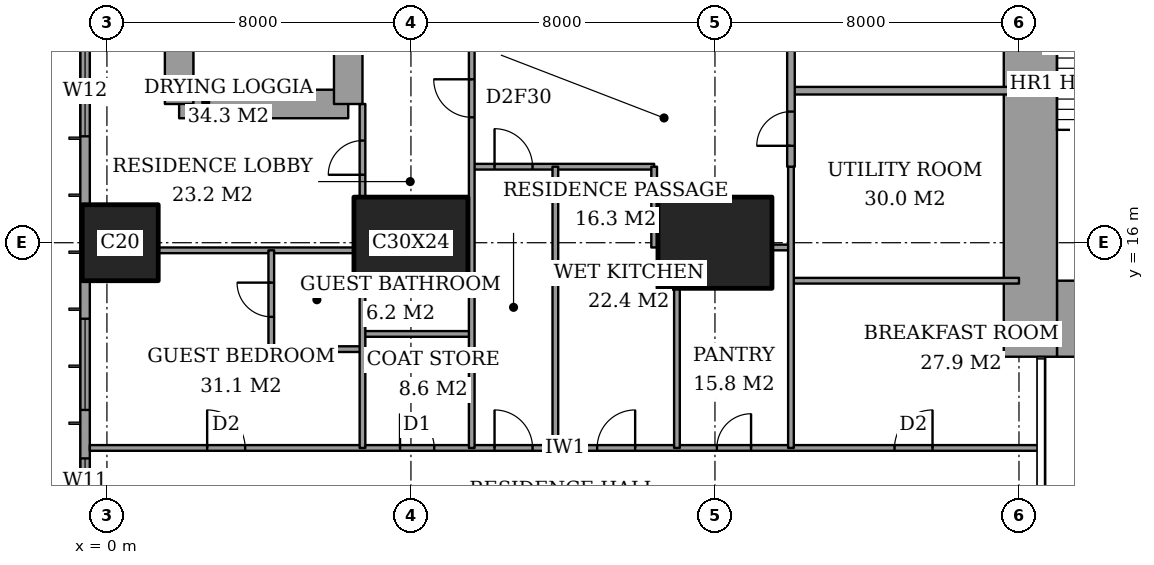
"""IFC4 building model, lengths in metres.
Left out: names, types, materials, properties, quantities, classifications, styles, units other than length and angle.
Written with IfcOpenShell. Run it as: python <this file> out.ifc"""

import sys

from ifc_helpers import new_model, si_unit, direction, frame, frame_2d, origin, origin_2d, place, context, subcontext, project, spatial, rectangle, extrude, element, fill, save


model = new_model("IFC4")
c1 = context("Model", 3, precision=1e-05, world=origin(), true_north=direction((0.0, 1.0)))
c2 = subcontext(c1, "Body", "Model", "MODEL_VIEW")
j1 = project(units=[si_unit("LENGTHUNIT", "METRE"), si_unit("PLANEANGLEUNIT", "RADIAN")], contexts=[c1])
p1 = place(None, origin())
s1 = spatial("IfcSite", under=j1, at=p1, CompositionType="ELEMENT")
p2 = place(p1, origin())
s2 = spatial("IfcBuilding", under=s1, at=p2, CompositionType="ELEMENT")
p3 = place(p2, frame((0.0, 0.0, 110.6)))
s3 = spatial("IfcBuildingStorey", under=s2, at=p3, CompositionType="ELEMENT", Elevation=110.6)
p4 = place(p3, frame((0.35, 16.0, 0.0), z_axis=(0.0, 0.0, 1.0), x_axis=(1.0, 0.0, 0.0)))
e1 = element("IfcColumn", 1, at=p4, inside=s3, PredefinedType="COLUMN", context=c2, shape_type="SweptSolid", body=[
    extrude(rectangle(XDim=2.0, YDim=2.0, at=origin_2d()), origin(), (0.0, 0.0, 1.0), 3.6),
])
for number, where, z_axis, x_axis in (
    (2, (8.0, 16.0, 0.0), (0.0, 0.0, 1.0), (1.0, 0.0, 0.0)),
    (3, (16.0, 16.0, 0.0), (0.0, 0.0, 1.0), (1.0, 0.0, 0.0)),
):
    element("IfcColumn", number, at=place(p3, frame(where, z_axis=z_axis, x_axis=x_axis)), inside=s3, PredefinedType="COLUMN", context=c2, shape_type="SweptSolid", body=[
        extrude(rectangle(XDim=3.0, YDim=2.4, at=origin_2d()), origin(), (0.0, 0.0, 1.0), 3.6),
    ])
p5 = place(p3, frame((25.0, 14.0, 0.0), z_axis=(0.0, 0.0, 1.0), x_axis=(1.0, 0.0, 0.0)))
e4 = element("IfcWall", 4, at=p5, inside=s3, PredefinedType="SHEAR", context=c2, shape_type="SweptSolid", body=[
    extrude(rectangle(XDim=3.15, YDim=2.0, at=frame_2d((1.575, 0.0))), origin(), (0.0, 0.0, 1.0), 3.6),
])
p6 = place(p3, frame((24.3, 13.0, 0.0), z_axis=(0.0, 0.0, 1.0), x_axis=(0.0, 1.0, 0.0)))
e5 = element("IfcWall", 5, at=p6, inside=s3, PredefinedType="SHEAR", context=c2, shape_type="SweptSolid", body=[
    extrude(rectangle(XDim=10.15, YDim=1.4, at=frame_2d((5.075, 0.0))), origin(), (0.0, 0.0, 1.0), 3.6),
])
p7 = place(p3, frame((1.9, 19.65, 0.0), z_axis=(0.0, 0.0, 1.0), x_axis=(1.0, 0.0, 0.0)))
e6 = element("IfcWall", 6, at=p7, inside=s3, PredefinedType="SHEAR", context=c2, shape_type="SweptSolid", body=[
    extrude(rectangle(XDim=4.45, YDim=0.75, at=frame_2d((2.225, 0.0))), origin(), (0.0, 0.0, 1.0), 3.6),
])
p8 = place(p3, frame((6.35, 19.65, 0.0), z_axis=(0.0, 0.0, 1.0), x_axis=(0.0, 1.0, 0.0)))
e7 = element("IfcWall", 7, at=p8, inside=s3, PredefinedType="SHEAR", context=c2, shape_type="SweptSolid", body=[
    extrude(rectangle(XDim=8.7, YDim=0.75, at=frame_2d((4.35, 0.0))), origin(), (0.0, 0.0, 1.0), 3.6),
])
p9 = place(p8, frame((6.725, 0.0, 0.0)))
e8 = element("IfcOpeningElement", 8, at=p9, cuts=e7, PredefinedType="OPENING", context=c2, shape_type="SweptSolid", body=[
    extrude(rectangle(XDim=1.0, YDim=2.1, at=frame_2d((0.5, 1.05))), frame((0.0, 0.385, 0.0), z_axis=(0.0, -1.0, 0.0), x_axis=(1.0, 0.0, 0.0)), (0.0, 0.0, 1.0), 0.77),
])
p10 = place(p3, frame((1.9, 28.35, 0.0), z_axis=(0.0, 0.0, 1.0), x_axis=(0.0, -1.0, 0.0)))
e9 = element("IfcWall", 9, at=p10, inside=s3, PredefinedType="SHEAR", context=c2, shape_type="SweptSolid", body=[
    extrude(rectangle(XDim=8.7, YDim=0.75, at=frame_2d((4.35, 0.0))), origin(), (0.0, 0.0, 1.0), 3.6),
])
p11 = place(p3, frame((-0.575, 44.825, 0.0), z_axis=(0.0, 0.0, 1.0), x_axis=(0.0, -1.0, 0.0)))
e10 = element("IfcWall", 10, at=p11, inside=s3, PredefinedType="SOLIDWALL", context=c2, shape_type="SweptSolid", body=[
    extrude(rectangle(XDim=41.65, YDim=0.25, at=frame_2d((20.825, 0.0))), origin(), (0.0, 0.0, 1.0), 3.6),
])
p12 = place(p11, frame((0.775, 0.0, 0.4)))
e11 = element("IfcOpeningElement", 11, at=p12, cuts=e10, PredefinedType="OPENING", context=c2, shape_type="SweptSolid", body=[
    extrude(rectangle(XDim=2.4, YDim=2.2, at=frame_2d((1.2, 1.1))), frame((0.0, 0.135, 0.0), z_axis=(0.0, -1.0, 0.0), x_axis=(1.0, 0.0, 0.0)), (0.0, 0.0, 1.0), 0.27),
])
p13 = place(p11, frame((6.2, 0.0, 0.4)))
e12 = element("IfcOpeningElement", 12, at=p13, cuts=e10, PredefinedType="OPENING", context=c2, shape_type="SweptSolid", body=[
    extrude(rectangle(XDim=1.2, YDim=2.2, at=frame_2d((0.6, 1.1))), frame((0.0, 0.135, 0.0), z_axis=(0.0, -1.0, 0.0), x_axis=(1.0, 0.0, 0.0)), (0.0, 0.0, 1.0), 0.27),
])
p14 = place(p11, frame((8.525, 0.0, 0.4)))
e13 = element("IfcOpeningElement", 13, at=p14, cuts=e10, PredefinedType="OPENING", context=c2, shape_type="SweptSolid", body=[
    extrude(rectangle(XDim=2.4, YDim=2.2, at=frame_2d((1.2, 1.1))), frame((0.0, 0.135, 0.0), z_axis=(0.0, -1.0, 0.0), x_axis=(1.0, 0.0, 0.0)), (0.0, 0.0, 1.0), 0.27),
])
p15 = place(p11, frame((15.625, 0.0, 0.4)))
e14 = element("IfcOpeningElement", 14, at=p15, cuts=e10, PredefinedType="OPENING", context=c2, shape_type="SweptSolid", body=[
    extrude(rectangle(XDim=2.4, YDim=2.2, at=frame_2d((1.2, 1.1))), frame((0.0, 0.135, 0.0), z_axis=(0.0, -1.0, 0.0), x_axis=(1.0, 0.0, 0.0)), (0.0, 0.0, 1.0), 0.27),
])
p16 = place(p11, frame((23.625, 0.0, 0.4)))
e15 = element("IfcOpeningElement", 15, at=p16, cuts=e10, PredefinedType="OPENING", context=c2, shape_type="SweptSolid", body=[
    extrude(rectangle(XDim=2.4, YDim=2.2, at=frame_2d((1.2, 1.1))), frame((0.0, 0.135, 0.0), z_axis=(0.0, -1.0, 0.0), x_axis=(1.0, 0.0, 0.0)), (0.0, 0.0, 1.0), 0.27),
])
p17 = place(p11, frame((30.825, 0.0, 0.4)))
e16 = element("IfcOpeningElement", 16, at=p17, cuts=e10, PredefinedType="OPENING", context=c2, shape_type="SweptSolid", body=[
    extrude(rectangle(XDim=2.4, YDim=2.2, at=frame_2d((1.2, 1.1))), frame((0.0, 0.135, 0.0), z_axis=(0.0, -1.0, 0.0), x_axis=(1.0, 0.0, 0.0)), (0.0, 0.0, 1.0), 0.27),
])
p18 = place(p11, frame((34.5, 0.0, 0.4)))
e17 = element("IfcOpeningElement", 17, at=p18, cuts=e10, PredefinedType="OPENING", context=c2, shape_type="SweptSolid", body=[
    extrude(rectangle(XDim=1.2, YDim=2.2, at=frame_2d((0.6, 1.1))), frame((0.0, 0.135, 0.0), z_axis=(0.0, -1.0, 0.0), x_axis=(1.0, 0.0, 0.0)), (0.0, 0.0, 1.0), 0.27),
])
p19 = place(p11, frame((38.475, 0.0, 0.4)))
e18 = element("IfcOpeningElement", 18, at=p19, cuts=e10, PredefinedType="OPENING", context=c2, shape_type="SweptSolid", body=[
    extrude(rectangle(XDim=2.4, YDim=2.2, at=frame_2d((1.2, 1.1))), frame((0.0, 0.135, 0.0), z_axis=(0.0, -1.0, 0.0), x_axis=(1.0, 0.0, 0.0)), (0.0, 0.0, 1.0), 0.27),
])
p20 = place(p3, frame((-0.45, 10.6, 0.0), z_axis=(0.0, 0.0, 1.0), x_axis=(1.0, 0.0, 0.0)))
e19 = element("IfcWall", 19, at=p20, inside=s3, PredefinedType="PARTITIONING", context=c2, shape_type="SweptSolid", body=[
    extrude(rectangle(XDim=25.011, YDim=0.15, at=frame_2d((12.505, 0.0))), origin(), (0.0, 0.0, 1.0), 3.35),
])
p21 = place(p20, frame((10.65, 0.0, 0.0)))
e20 = element("IfcOpeningElement", 20, at=p21, cuts=e19, PredefinedType="OPENING", context=c2, shape_type="SweptSolid", body=[
    extrude(rectangle(XDim=1.0, YDim=2.1, at=frame_2d((0.5, 1.05))), frame((0.0, 0.085, 0.0), z_axis=(0.0, -1.0, 0.0), x_axis=(1.0, 0.0, 0.0)), (0.0, 0.0, 1.0), 0.17),
])
p22 = place(p20, frame((3.087, 0.0, 0.0)))
e21 = element("IfcOpeningElement", 21, at=p22, cuts=e19, PredefinedType="OPENING", context=c2, shape_type="SweptSolid", body=[
    extrude(rectangle(XDim=1.0, YDim=2.1, at=frame_2d((0.5, 1.05))), frame((0.0, 0.085, 0.0), z_axis=(0.0, -1.0, 0.0), x_axis=(1.0, 0.0, 0.0)), (0.0, 0.0, 1.0), 0.17),
])
p23 = place(p20, frame((8.163, 0.0, 0.0)))
e22 = element("IfcOpeningElement", 22, at=p23, cuts=e19, PredefinedType="OPENING", context=c2, shape_type="SweptSolid", body=[
    extrude(rectangle(XDim=0.9, YDim=2.1, at=frame_2d((0.45, 1.05))), frame((0.0, 0.085, 0.0), z_axis=(0.0, -1.0, 0.0), x_axis=(1.0, 0.0, 0.0)), (0.0, 0.0, 1.0), 0.17),
])
p24 = place(p20, frame((13.35, 0.0, 0.0)))
e23 = element("IfcOpeningElement", 23, at=p24, cuts=e19, PredefinedType="OPENING", context=c2, shape_type="SweptSolid", body=[
    extrude(rectangle(XDim=1.0, YDim=2.1, at=frame_2d((0.5, 1.05))), frame((0.0, 0.085, 0.0), z_axis=(0.0, -1.0, 0.0), x_axis=(1.0, 0.0, 0.0)), (0.0, 0.0, 1.0), 0.17),
])
p25 = place(p20, frame((16.5, 0.0, 0.0)))
e24 = element("IfcOpeningElement", 24, at=p25, cuts=e19, PredefinedType="OPENING", context=c2, shape_type="SweptSolid", body=[
    extrude(rectangle(XDim=0.9, YDim=2.1, at=frame_2d((0.45, 1.05))), frame((0.0, 0.085, 0.0), z_axis=(0.0, -1.0, 0.0), x_axis=(1.0, 0.0, 0.0)), (0.0, 0.0, 1.0), 0.17),
])
p26 = place(p20, frame((21.175, 0.0, 0.0)))
e25 = element("IfcOpeningElement", 25, at=p26, cuts=e19, PredefinedType="OPENING", context=c2, shape_type="SweptSolid", body=[
    extrude(rectangle(XDim=1.0, YDim=2.1, at=frame_2d((0.5, 1.05))), frame((0.0, 0.085, 0.0), z_axis=(0.0, -1.0, 0.0), x_axis=(1.0, 0.0, 0.0)), (0.0, 0.0, 1.0), 0.17),
])
p27 = place(p3, frame((4.325, 13.2, 0.0), z_axis=(0.0, 0.0, 1.0), x_axis=(1.0, 0.0, 0.0)))
e26 = element("IfcWall", 26, at=p27, inside=s3, PredefinedType="PARTITIONING", context=c2, shape_type="SweptSolid", body=[
    extrude(rectangle(XDim=2.4, YDim=0.15, at=frame_2d((1.2, 0.0))), origin(), (0.0, 0.0, 1.0), 3.35),
])
p28 = place(p3, frame((6.725, 13.6, 0.0), z_axis=(0.0, 0.0, 1.0), x_axis=(1.0, 0.0, 0.0)))
e27 = element("IfcWall", 27, at=p28, inside=s3, PredefinedType="PARTITIONING", context=c2, shape_type="SweptSolid", body=[
    extrude(rectangle(XDim=2.875, YDim=0.15, at=frame_2d((1.438, 0.0))), origin(), (0.0, 0.0, 1.0), 3.35),
])
p29 = place(p3, frame((18.0, 15.0, 0.0), z_axis=(0.0, 0.0, 1.0), x_axis=(1.0, 0.0, 0.0)))
e28 = element("IfcWall", 28, at=p29, inside=s3, PredefinedType="PARTITIONING", context=c2, shape_type="SweptSolid", body=[
    extrude(rectangle(XDim=6.0, YDim=0.15, at=frame_2d((3.0, 0.0))), origin(), (0.0, 0.0, 1.0), 3.35),
])
p30 = place(p3, frame((1.35, 15.8, 0.0), z_axis=(0.0, 0.0, 1.0), x_axis=(1.0, 0.0, 0.0)))
e29 = element("IfcWall", 29, at=p30, inside=s3, PredefinedType="PARTITIONING", context=c2, shape_type="SweptSolid", body=[
    extrude(rectangle(XDim=5.15, YDim=0.15, at=frame_2d((2.575, 0.0))), origin(), (0.0, 0.0, 1.0), 3.35),
])
p31 = place(p3, frame((17.5, 15.875, 0.0), z_axis=(0.0, 0.0, 1.0), x_axis=(1.0, 0.0, 0.0)))
e30 = element("IfcWall", 30, at=p31, inside=s3, PredefinedType="PARTITIONING", context=c2, shape_type="SweptSolid", body=[
    extrude(rectangle(XDim=0.5, YDim=0.15, at=frame_2d((0.25, 0.0))), origin(), (0.0, 0.0, 1.0), 2.634),
])
p32 = place(p3, frame((9.6, 18.0, 0.0), z_axis=(0.0, 0.0, 1.0), x_axis=(1.0, 0.0, 0.0)))
e31 = element("IfcWall", 31, at=p32, inside=s3, PredefinedType="PARTITIONING", context=c2, shape_type="SweptSolid", body=[
    extrude(rectangle(XDim=4.8, YDim=0.15, at=frame_2d((2.4, 0.0))), origin(), (0.0, 0.0, 1.0), 3.35),
])
p33 = place(p32, frame((0.6, 0.0, 0.0)))
e32 = element("IfcOpeningElement", 32, at=p33, cuts=e31, PredefinedType="OPENING", context=c2, shape_type="SweptSolid", body=[
    extrude(rectangle(XDim=1.0, YDim=2.1, at=frame_2d((0.5, 1.05))), frame((0.0, 0.085, 0.0), z_axis=(0.0, -1.0, 0.0), x_axis=(1.0, 0.0, 0.0)), (0.0, 0.0, 1.0), 0.17),
])
p34 = place(p3, frame((18.0, 20.0, 0.0), z_axis=(0.0, 0.0, 1.0), x_axis=(1.0, 0.0, 0.0)))
e33 = element("IfcWall", 33, at=p34, inside=s3, PredefinedType="PARTITIONING", context=c2, shape_type="SweptSolid", body=[
    extrude(rectangle(XDim=6.0, YDim=0.2, at=frame_2d((3.0, 0.0))), origin(), (0.0, 0.0, 1.0), 3.35),
])
p35 = place(p3, frame((4.325, 13.2, 0.0), z_axis=(0.0, 0.0, 1.0), x_axis=(0.0, 1.0, 0.0)))
e34 = element("IfcWall", 34, at=p35, inside=s3, PredefinedType="PARTITIONING", context=c2, shape_type="SweptSolid", body=[
    extrude(rectangle(XDim=2.6, YDim=0.15, at=frame_2d((1.3, 0.0))), origin(), (0.0, 0.0, 1.0), 3.35),
])
p36 = place(p35, frame((0.85, 0.0, 0.0)))
e35 = element("IfcOpeningElement", 35, at=p36, cuts=e34, PredefinedType="OPENING", context=c2, shape_type="SweptSolid", body=[
    extrude(rectangle(XDim=0.9, YDim=2.1, at=frame_2d((0.45, 1.05))), frame((0.0, 0.085, 0.0), z_axis=(0.0, -1.0, 0.0), x_axis=(1.0, 0.0, 0.0)), (0.0, 0.0, 1.0), 0.17),
])
p37 = place(p3, frame((6.725, 10.6, 0.0), z_axis=(0.0, 0.0, 1.0), x_axis=(0.0, 1.0, 0.0)))
e36 = element("IfcWall", 36, at=p37, inside=s3, PredefinedType="PARTITIONING", context=c2, shape_type="SweptSolid", body=[
    extrude(rectangle(XDim=4.2, YDim=0.15, at=frame_2d((2.1, 0.0))), origin(), (0.0, 0.0, 1.0), 3.35),
])
p38 = place(p3, frame((6.725, 17.2, 0.0), z_axis=(0.0, 0.0, 1.0), x_axis=(0.0, 1.0, 0.0)))
e37 = element("IfcWall", 37, at=p38, inside=s3, PredefinedType="PARTITIONING", context=c2, shape_type="SweptSolid", body=[
    extrude(rectangle(XDim=2.45, YDim=0.15, at=frame_2d((1.225, 0.0))), origin(), (0.0, 0.0, 1.0), 3.35),
])
p39 = place(p38, frame((0.587, 0.0, 0.0)))
e38 = element("IfcOpeningElement", 38, at=p39, cuts=e37, PredefinedType="OPENING", context=c2, shape_type="SweptSolid", body=[
    extrude(rectangle(XDim=0.9, YDim=2.1, at=frame_2d((0.45, 1.05))), frame((0.0, 0.085, 0.0), z_axis=(0.0, -1.0, 0.0), x_axis=(1.0, 0.0, 0.0)), (0.0, 0.0, 1.0), 0.17),
])
p40 = place(p3, frame((9.6, 10.6, 0.0), z_axis=(0.0, 0.0, 1.0), x_axis=(0.0, 1.0, 0.0)))
e39 = element("IfcWall", 39, at=p40, inside=s3, PredefinedType="PARTITIONING", context=c2, shape_type="SweptSolid", body=[
    extrude(rectangle(XDim=11.0, YDim=0.15, at=frame_2d((5.5, 0.0))), origin(), (0.0, 0.0, 1.0), 3.35),
])
p41 = place(p40, frame((8.7, 0.0, 0.0)))
e40 = element("IfcOpeningElement", 40, at=p41, cuts=e39, PredefinedType="OPENING", context=c2, shape_type="SweptSolid", body=[
    extrude(rectangle(XDim=1.0, YDim=2.1, at=frame_2d((0.5, 1.05))), frame((0.0, 0.085, 0.0), z_axis=(0.0, -1.0, 0.0), x_axis=(1.0, 0.0, 0.0)), (0.0, 0.0, 1.0), 0.17),
])
p42 = place(p3, frame((11.8, 10.6, 0.0), z_axis=(0.0, 0.0, 1.0), x_axis=(0.0, 1.0, 0.0)))
e41 = element("IfcWall", 41, at=p42, inside=s3, PredefinedType="PARTITIONING", context=c2, shape_type="SweptSolid", body=[
    extrude(rectangle(XDim=7.4, YDim=0.15, at=frame_2d((3.7, 0.0))), origin(), (0.0, 0.0, 1.0), 3.35),
])
p43 = place(p3, frame((14.4, 15.875, 0.0), z_axis=(0.0, 0.0, 1.0), x_axis=(0.0, 1.0, 0.0)))
e42 = element("IfcWall", 42, at=p43, inside=s3, PredefinedType="PARTITIONING", context=c2, shape_type="SweptSolid", body=[
    extrude(rectangle(XDim=2.125, YDim=0.15, at=frame_2d((1.062, 0.0))), origin(), (0.0, 0.0, 1.0), 3.35),
])
p44 = place(p3, frame((15.0, 10.6, 0.0), z_axis=(0.0, 0.0, 1.0), x_axis=(0.0, 1.0, 0.0)))
e43 = element("IfcWall", 43, at=p44, inside=s3, PredefinedType="PARTITIONING", context=c2, shape_type="SweptSolid", body=[
    extrude(rectangle(XDim=4.2, YDim=0.15, at=frame_2d((2.1, 0.0))), origin(), (0.0, 0.0, 1.0), 3.35),
])
p45 = place(p3, frame((18.0, 18.0, 0.0), z_axis=(0.0, 0.0, 1.0), x_axis=(0.0, 1.0, 0.0)))
e44 = element("IfcWall", 44, at=p45, inside=s3, PredefinedType="PARTITIONING", context=c2, shape_type="SweptSolid", body=[
    extrude(rectangle(XDim=6.0, YDim=0.2, at=frame_2d((3.0, 0.0))), origin(), (0.0, 0.0, 1.0), 3.35),
])
p46 = place(p45, frame((3.4, 0.0, 0.0)))
e45 = element("IfcOpeningElement", 45, at=p46, cuts=e44, PredefinedType="OPENING", context=c2, shape_type="SweptSolid", body=[
    extrude(rectangle(XDim=1.2, YDim=2.4, at=frame_2d((0.6, 1.2))), frame((0.0, 0.11, 0.0), z_axis=(0.0, -1.0, 0.0), x_axis=(1.0, 0.0, 0.0)), (0.0, 0.0, 1.0), 0.22),
])
p47 = place(p45, frame((0.55, 0.0, 0.0)))
e46 = element("IfcOpeningElement", 46, at=p47, cuts=e44, PredefinedType="OPENING", context=c2, shape_type="SweptSolid", body=[
    extrude(rectangle(XDim=0.9, YDim=2.1, at=frame_2d((0.45, 1.05))), frame((0.0, 0.11, 0.0), z_axis=(0.0, -1.0, 0.0), x_axis=(1.0, 0.0, 0.0)), (0.0, 0.0, 1.0), 0.22),
])
p48 = place(p3, frame((18.0, 10.6, 0.0), z_axis=(0.0, 0.0, 1.0), x_axis=(0.0, 1.0, 0.0)))
e47 = element("IfcWall", 47, at=p48, inside=s3, PredefinedType="PARTITIONING", context=c2, shape_type="SweptSolid", body=[
    extrude(rectangle(XDim=7.4, YDim=0.15, at=frame_2d((3.7, 0.0))), origin(), (0.0, 0.0, 1.0), 3.35),
])
p49 = place(p16, origin())
e48 = element("IfcWindow", 48, at=p49, inside=s3, PartitioningType="SINGLE_PANEL", PredefinedType="WINDOW", context=c2, shape_type="SweptSolid", body=[
    extrude(rectangle(XDim=2.4, YDim=2.2, at=frame_2d((1.2, 1.1))), frame((0.0, 0.03, 0.0), z_axis=(0.0, -1.0, 0.0), x_axis=(1.0, 0.0, 0.0)), (0.0, 0.0, 1.0), 0.06),
])
fill(e15, e48)
p50 = place(p17, origin())
e49 = element("IfcWindow", 49, at=p50, inside=s3, PartitioningType="SINGLE_PANEL", PredefinedType="WINDOW", context=c2, shape_type="SweptSolid", body=[
    extrude(rectangle(XDim=2.4, YDim=2.2, at=frame_2d((1.2, 1.1))), frame((0.0, 0.03, 0.0), z_axis=(0.0, -1.0, 0.0), x_axis=(1.0, 0.0, 0.0)), (0.0, 0.0, 1.0), 0.06),
])
fill(e16, e49)
p51 = place(p18, origin())
e50 = element("IfcWindow", 50, at=p51, inside=s3, PartitioningType="SINGLE_PANEL", PredefinedType="WINDOW", context=c2, shape_type="SweptSolid", body=[
    extrude(rectangle(XDim=1.2, YDim=2.2, at=frame_2d((0.6, 1.1))), frame((0.0, 0.03, 0.0), z_axis=(0.0, -1.0, 0.0), x_axis=(1.0, 0.0, 0.0)), (0.0, 0.0, 1.0), 0.06),
])
fill(e17, e50)
p52 = place(p21, origin())
e51 = element("IfcDoor", 51, at=p52, inside=s3, OperationType="SINGLE_SWING_RIGHT", PredefinedType="DOOR", context=c2, shape_type="SweptSolid", body=[
    extrude(rectangle(XDim=1.0, YDim=2.1, at=frame_2d((0.5, 1.05))), frame((0.0, 0.025, 0.0), z_axis=(0.0, -1.0, 0.0), x_axis=(1.0, 0.0, 0.0)), (0.0, 0.0, 1.0), 0.05),
])
fill(e20, e51)
p53 = place(p36, origin())
e52 = element("IfcDoor", 52, at=p53, inside=s3, OperationType="SINGLE_SWING_LEFT", PredefinedType="DOOR", context=c2, shape_type="SweptSolid", body=[
    extrude(rectangle(XDim=0.9, YDim=2.1, at=frame_2d((0.45, 1.05))), frame((0.0, 0.025, 0.0), z_axis=(0.0, -1.0, 0.0), x_axis=(1.0, 0.0, 0.0)), (0.0, 0.0, 1.0), 0.05),
])
fill(e35, e52)
p54 = place(p22, origin())
e53 = element("IfcDoor", 53, at=p54, inside=s3, OperationType="SINGLE_SWING_RIGHT", PredefinedType="DOOR", context=c2, shape_type="SweptSolid", body=[
    extrude(rectangle(XDim=1.0, YDim=2.1, at=frame_2d((0.5, 1.05))), frame((0.0, 0.025, 0.0), z_axis=(0.0, -1.0, 0.0), x_axis=(1.0, 0.0, 0.0)), (0.0, 0.0, 1.0), 0.05),
])
fill(e21, e53)
p55 = place(p39, origin())
e54 = element("IfcDoor", 54, at=p55, inside=s3, OperationType="SINGLE_SWING_RIGHT", PredefinedType="DOOR", context=c2, shape_type="SweptSolid", body=[
    extrude(rectangle(XDim=0.9, YDim=2.1, at=frame_2d((0.45, 1.05))), frame((0.0, 0.025, 0.0), z_axis=(0.0, -1.0, 0.0), x_axis=(1.0, 0.0, 0.0)), (0.0, 0.0, 1.0), 0.05),
])
fill(e38, e54)
p56 = place(p23, origin())
e55 = element("IfcDoor", 55, at=p56, inside=s3, OperationType="SINGLE_SWING_RIGHT", PredefinedType="DOOR", context=c2, shape_type="SweptSolid", body=[
    extrude(rectangle(XDim=0.9, YDim=2.1, at=frame_2d((0.45, 1.05))), frame((0.0, 0.025, 0.0), z_axis=(0.0, -1.0, 0.0), x_axis=(1.0, 0.0, 0.0)), (0.0, 0.0, 1.0), 0.05),
])
fill(e22, e55)
p57 = place(p41, origin())
e56 = element("IfcDoor", 56, at=p57, inside=s3, OperationType="SINGLE_SWING_LEFT", PredefinedType="DOOR", context=c2, shape_type="SweptSolid", body=[
    extrude(rectangle(XDim=1.0, YDim=2.1, at=frame_2d((0.5, 1.05))), frame((0.0, 0.025, 0.0), z_axis=(0.0, -1.0, 0.0), x_axis=(1.0, 0.0, 0.0)), (0.0, 0.0, 1.0), 0.05),
])
fill(e40, e56)
p58 = place(p33, origin())
e57 = element("IfcDoor", 57, at=p58, inside=s3, OperationType="SINGLE_SWING_RIGHT", PredefinedType="DOOR", context=c2, shape_type="SweptSolid", body=[
    extrude(rectangle(XDim=1.0, YDim=2.1, at=frame_2d((0.5, 1.05))), frame((0.0, 0.025, 0.0), z_axis=(0.0, -1.0, 0.0), x_axis=(1.0, 0.0, 0.0)), (0.0, 0.0, 1.0), 0.05),
])
fill(e32, e57)
p59 = place(p24, origin())
e58 = element("IfcDoor", 58, at=p59, inside=s3, OperationType="SINGLE_SWING_LEFT", PredefinedType="DOOR", context=c2, shape_type="SweptSolid", body=[
    extrude(rectangle(XDim=1.0, YDim=2.1, at=frame_2d((0.5, 1.05))), frame((0.0, 0.025, 0.0), z_axis=(0.0, -1.0, 0.0), x_axis=(1.0, 0.0, 0.0)), (0.0, 0.0, 1.0), 0.05),
])
fill(e23, e58)
p60 = place(p25, origin())
e59 = element("IfcDoor", 59, at=p60, inside=s3, OperationType="SINGLE_SWING_LEFT", PredefinedType="DOOR", context=c2, shape_type="SweptSolid", body=[
    extrude(rectangle(XDim=0.9, YDim=2.1, at=frame_2d((0.45, 1.05))), frame((0.0, 0.025, 0.0), z_axis=(0.0, -1.0, 0.0), x_axis=(1.0, 0.0, 0.0)), (0.0, 0.0, 1.0), 0.05),
])
fill(e24, e59)
p61 = place(p26, origin())
e60 = element("IfcDoor", 60, at=p61, inside=s3, OperationType="SINGLE_SWING_LEFT", PredefinedType="DOOR", context=c2, shape_type="SweptSolid", body=[
    extrude(rectangle(XDim=1.0, YDim=2.1, at=frame_2d((0.5, 1.05))), frame((0.0, 0.025, 0.0), z_axis=(0.0, -1.0, 0.0), x_axis=(1.0, 0.0, 0.0)), (0.0, 0.0, 1.0), 0.05),
])
fill(e25, e60)
p62 = place(p47, origin())
e61 = element("IfcDoor", 61, at=p62, inside=s3, OperationType="SINGLE_SWING_RIGHT", PredefinedType="DOOR", context=c2, shape_type="SweptSolid", body=[
    extrude(rectangle(XDim=0.9, YDim=2.1, at=frame_2d((0.45, 1.05))), frame((0.0, 0.025, 0.0), z_axis=(0.0, -1.0, 0.0), x_axis=(1.0, 0.0, 0.0)), (0.0, 0.0, 1.0), 0.05),
])
fill(e46, e61)
save(model, sys.argv[1])
